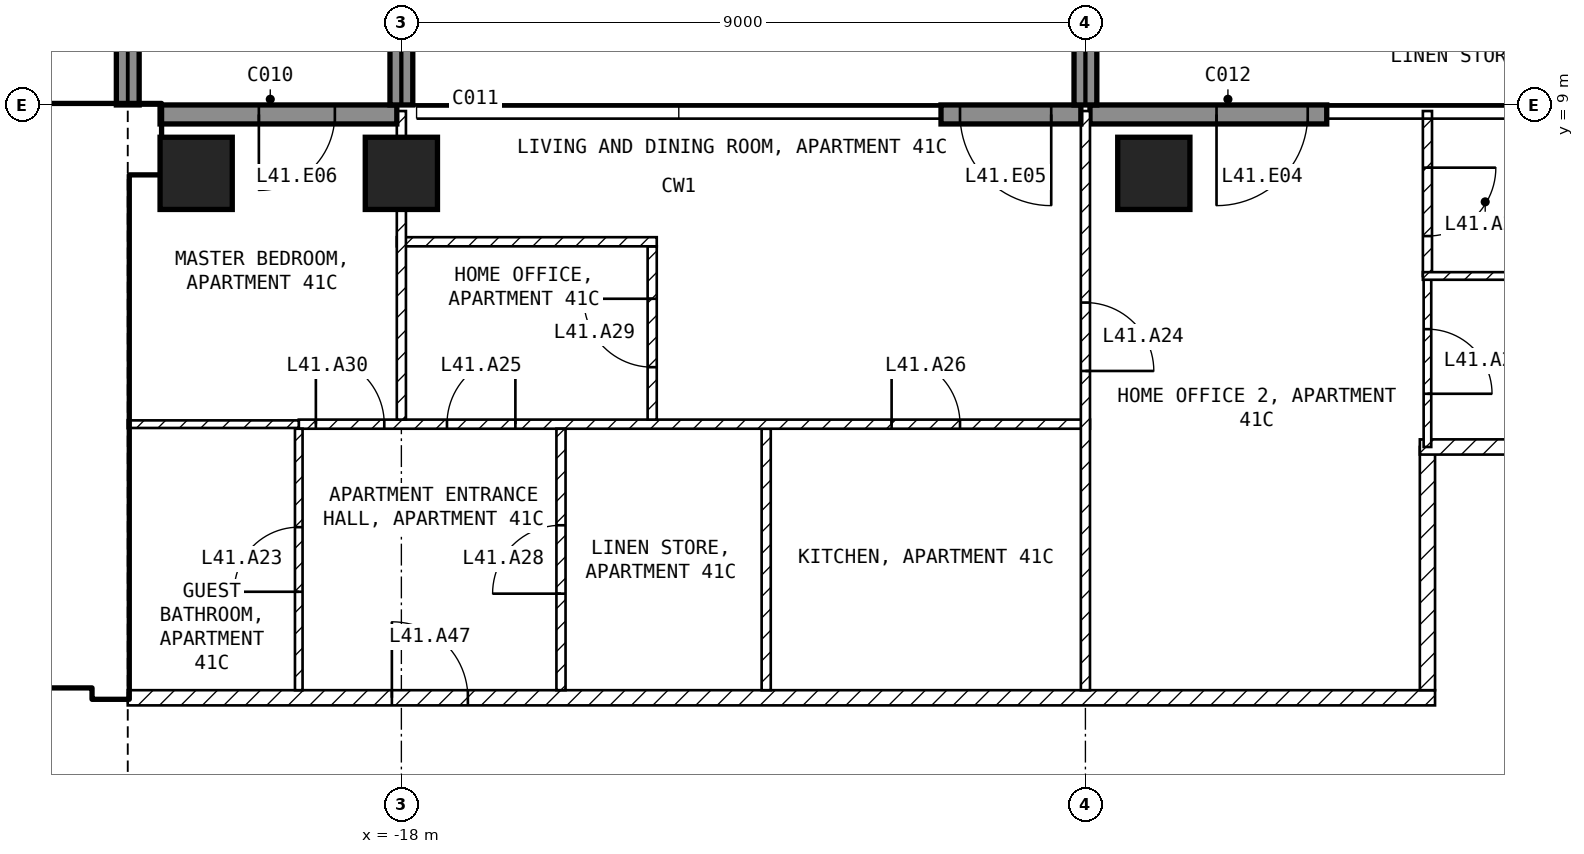
"""IFC4 building model, lengths in metres.
Left out: names, types, materials, properties, quantities, classifications, styles, units other than length and angle.
Written with IfcOpenShell. Run it as: python <this file> out.ifc"""

import sys

from ifc_helpers import new_model, si_unit, direction, frame, frame_2d, origin, origin_2d, place, context, subcontext, project, spatial, rectangle, extrude, element, fill, save


model = new_model("IFC4")
c1 = context("Model", 3, precision=1e-05, world=origin(), true_north=direction((0.0, 1.0)))
c2 = subcontext(c1, "Body", "Model", "MODEL_VIEW")
j1 = project(units=[si_unit("LENGTHUNIT", "METRE"), si_unit("PLANEANGLEUNIT", "RADIAN")], contexts=[c1])
p1 = place(None, origin())
s1 = spatial("IfcSite", under=j1, at=p1, CompositionType="ELEMENT")
p2 = place(p1, origin())
s2 = spatial("IfcBuilding", under=s1, at=p2, CompositionType="ELEMENT")
p3 = place(p2, frame((0.0, 0.0, 170.1)))
s3 = spatial("IfcBuildingStorey", under=s2, at=p3, CompositionType="ELEMENT", Elevation=170.1)
for number, where, z_axis, x_axis in (
    (1, (-20.7, 8.1, -0.25), (0.0, 0.0, 1.0), (1.0, 0.0, 0.0)),
    (2, (-18.0, 8.1, -0.25), (0.0, 0.0, 1.0), (1.0, 0.0, 0.0)),
    (3, (-8.1, 8.1, -0.25), (0.0, 0.0, 1.0), (1.0, 0.0, 0.0)),
):
    element("IfcColumn", number, at=place(p3, frame(where, z_axis=z_axis, x_axis=x_axis)), inside=s3, PredefinedType="COLUMN", context=c2, shape_type="SweptSolid", body=[
        extrude(rectangle(XDim=0.95, YDim=0.95, at=origin_2d()), origin(), (0.0, 0.0, 1.0), 3.5),
    ])
p4 = place(p3, frame((-5.825, 8.875, 0.0), z_axis=(0.0, 0.0, 1.0), x_axis=(-1.0, 0.0, 0.0)))
e4 = element("IfcWall", 4, at=p4, inside=s3, PredefinedType="SOLIDWALL", context=c2, shape_type="SweptSolid", body=[
    extrude(rectangle(XDim=3.115, YDim=0.25, at=frame_2d((1.558, 0.0))), origin(), (0.0, 0.0, 1.0), 3.25),
])
p5 = place(p4, frame((0.25, 0.0, 0.0)))
e5 = element("IfcOpeningElement", 5, at=p5, cuts=e4, PredefinedType="OPENING", context=c2, shape_type="SweptSolid", body=[
    extrude(rectangle(XDim=1.2, YDim=2.4, at=frame_2d((0.6, 1.2))), frame((0.0, 0.135, 0.0), z_axis=(0.0, -1.0, 0.0), x_axis=(1.0, 0.0, 0.0)), (0.0, 0.0, 1.0), 0.27),
])
p6 = place(p3, frame((-9.06, 8.875, 0.0), z_axis=(0.0, 0.0, 1.0), x_axis=(-1.0, 0.0, 0.0)))
e6 = element("IfcWall", 6, at=p6, inside=s3, PredefinedType="SOLIDWALL", context=c2, shape_type="SweptSolid", body=[
    extrude(rectangle(XDim=1.84, YDim=0.25, at=frame_2d((0.92, 0.0))), origin(), (0.0, 0.0, 1.0), 3.25),
])
p7 = place(p6, frame((0.39, 0.0, 0.0)))
e7 = element("IfcOpeningElement", 7, at=p7, cuts=e6, PredefinedType="OPENING", context=c2, shape_type="SweptSolid", body=[
    extrude(rectangle(XDim=1.2, YDim=2.4, at=frame_2d((0.6, 1.2))), frame((0.0, 0.135, 0.0), z_axis=(0.0, -1.0, 0.0), x_axis=(1.0, 0.0, 0.0)), (0.0, 0.0, 1.0), 0.27),
])
p8 = place(p3, frame((-18.06, 8.875, 0.0), z_axis=(0.0, 0.0, 1.0), x_axis=(-1.0, 0.0, 0.0)))
e8 = element("IfcWall", 8, at=p8, inside=s3, PredefinedType="SOLIDWALL", context=c2, shape_type="SweptSolid", body=[
    extrude(rectangle(XDim=3.115, YDim=0.25, at=frame_2d((1.558, 0.0))), origin(), (0.0, 0.0, 1.0), 3.25),
])
p9 = place(p8, frame((0.815, 0.0, 0.0)))
e9 = element("IfcOpeningElement", 9, at=p9, cuts=e8, PredefinedType="OPENING", context=c2, shape_type="SweptSolid", body=[
    extrude(rectangle(XDim=1.0, YDim=2.4, at=frame_2d((0.5, 1.2))), frame((0.0, 0.135, 0.0), z_axis=(0.0, -1.0, 0.0), x_axis=(1.0, 0.0, 0.0)), (0.0, 0.0, 1.0), 0.27),
])
for number, where, z_axis, x_axis in (
    (10, (-21.6, 9.0, 0.0), (0.0, 0.0, 1.0), (0.0, 1.0, 0.0)),
    (11, (-18.0, 9.0, 0.0), (0.0, 0.0, 1.0), (0.0, 1.0, 0.0)),
    (12, (-9.0, 9.0, 0.0), (0.0, 0.0, 1.0), (0.0, 1.0, 0.0)),
):
    element("IfcWall", number, at=place(p3, frame(where, z_axis=z_axis, x_axis=x_axis)), inside=s3, PredefinedType="SOLIDWALL", context=c2, shape_type="SweptSolid", body=[
        extrude(rectangle(XDim=2.7, YDim=0.3, at=frame_2d((1.35, 0.0))), origin(), (0.0, 0.0, 1.0), 3.25),
    ])
p10 = place(p3, frame((-29.6, 8.55, 0.0), z_axis=(0.0, 0.0, 1.0), x_axis=(1.0, 0.0, 0.0)))
e13 = element("IfcWall", 13, at=p10, inside=s3, PredefinedType="SHEAR", context=c2, shape_type="SweptSolid", body=[
    extrude(rectangle(XDim=8.425, YDim=0.9, at=frame_2d((4.212, 0.0))), origin(), (0.0, 0.0, 1.0), 3.25),
])
p11 = place(p3, frame((-21.825, 1.2, 0.0), z_axis=(0.0, 0.0, 1.0), x_axis=(0.0, 1.0, 0.0)))
e14 = element("IfcWall", 14, at=p11, inside=s3, PredefinedType="SHEAR", context=c2, shape_type="SweptSolid", body=[
    extrude(rectangle(XDim=6.9, YDim=0.45, at=frame_2d((3.45, 0.0))), origin(), (0.0, 0.0, 1.0), 3.25),
])
p12 = place(p3, frame((-33.2, 1.45, 0.0), z_axis=(0.0, 0.0, 1.0), x_axis=(1.0, 0.0, 0.0)))
e15 = element("IfcWall", 15, at=p12, inside=s3, PredefinedType="SOLIDWALL", context=c2, shape_type="SweptSolid", body=[
    extrude(rectangle(XDim=11.15, YDim=0.2, at=frame_2d((5.575, 0.0))), origin(), (0.0, 0.0, 1.0), 3.25),
])
p13 = place(p12, frame((9.4, 0.0, 0.0)))
e16 = element("IfcOpeningElement", 16, at=p13, cuts=e15, PredefinedType="OPENING", context=c2, shape_type="SweptSolid", body=[
    extrude(rectangle(XDim=1.0, YDim=2.1, at=frame_2d((0.5, 1.05))), frame((0.0, 0.11, 0.0), z_axis=(0.0, -1.0, 0.0), x_axis=(1.0, 0.0, 0.0)), (0.0, 0.0, 1.0), 0.22),
])
p14 = place(p12, frame((6.9, 0.0, 0.0)))
e17 = element("IfcOpeningElement", 17, at=p14, cuts=e15, PredefinedType="OPENING", context=c2, shape_type="SweptSolid", body=[
    extrude(rectangle(XDim=1.0, YDim=2.1, at=frame_2d((0.5, 1.05))), frame((0.0, 0.11, 0.0), z_axis=(0.0, -1.0, 0.0), x_axis=(1.0, 0.0, 0.0)), (0.0, 0.0, 1.0), 0.22),
])
p15 = place(p12, frame((1.1, 0.0, 0.0)))
e18 = element("IfcOpeningElement", 18, at=p15, cuts=e15, PredefinedType="OPENING", context=c2, shape_type="SweptSolid", body=[
    extrude(rectangle(XDim=0.9, YDim=2.1, at=frame_2d((0.45, 1.05))), frame((0.0, 0.11, 0.0), z_axis=(0.0, -1.0, 0.0), x_axis=(1.0, 0.0, 0.0)), (0.0, 0.0, 1.0), 0.22),
])
p16 = place(p3, frame((-28.35, 5.15, 0.0), z_axis=(0.0, 0.0, 1.0), x_axis=(1.0, 0.0, 0.0)))
e19 = element("IfcWall", 19, at=p16, inside=s3, PredefinedType="SOLIDWALL", context=c2, shape_type="SweptSolid", body=[
    extrude(rectangle(XDim=6.3, YDim=0.2, at=frame_2d((3.15, 0.0))), origin(), (0.0, 0.0, 1.0), 3.25),
])
p17 = place(p16, frame((5.1, 0.0, 0.0)))
e20 = element("IfcOpeningElement", 20, at=p17, cuts=e19, PredefinedType="OPENING", context=c2, shape_type="SweptSolid", body=[
    extrude(rectangle(XDim=1.0, YDim=2.1, at=frame_2d((0.5, 1.05))), frame((0.0, 0.11, 0.0), z_axis=(0.0, -1.0, 0.0), x_axis=(1.0, 0.0, 0.0)), (0.0, 0.0, 1.0), 0.22),
])
p18 = place(p3, frame((-21.6, 1.2, 0.0), z_axis=(0.0, 0.0, 1.0), x_axis=(1.0, 0.0, 0.0)))
e21 = element("IfcWall", 21, at=p18, inside=s3, PredefinedType="PARTITIONING", context=c2, shape_type="SweptSolid", body=[
    extrude(rectangle(XDim=17.2, YDim=0.2, at=frame_2d((8.6, 0.0))), origin(), (0.0, 0.0, 1.0), 3.25),
])
p19 = place(p18, frame((3.475, 0.0, 0.0)))
e22 = element("IfcOpeningElement", 22, at=p19, cuts=e21, PredefinedType="OPENING", context=c2, shape_type="SweptSolid", body=[
    extrude(rectangle(XDim=1.0, YDim=2.1, at=frame_2d((0.5, 1.05))), frame((0.0, 0.11, 0.0), z_axis=(0.0, -1.0, 0.0), x_axis=(1.0, 0.0, 0.0)), (0.0, 0.0, 1.0), 0.22),
])
p20 = place(p3, frame((-4.5, 1.3, 0.0), z_axis=(0.0, 0.0, 1.0), x_axis=(0.0, 1.0, 0.0)))
e23 = element("IfcWall", 23, at=p20, inside=s3, PredefinedType="PARTITIONING", context=c2, shape_type="SweptSolid", body=[
    extrude(rectangle(XDim=3.2, YDim=0.2, at=frame_2d((1.6, 0.0))), origin(), (0.0, 0.0, 1.0), 3.25),
])
p21 = place(p3, frame((-4.6, 4.5, 0.0), z_axis=(0.0, 0.0, 1.0), x_axis=(1.0, 0.0, 0.0)))
e24 = element("IfcWall", 24, at=p21, inside=s3, PredefinedType="PARTITIONING", context=c2, shape_type="SweptSolid", body=[
    extrude(rectangle(XDim=3.5, YDim=0.2, at=frame_2d((1.75, 0.0))), origin(), (0.0, 0.0, 1.0), 3.25),
])
p22 = place(p3, frame((-13.2, 1.3, 0.0), z_axis=(0.0, 0.0, 1.0), x_axis=(0.0, 1.0, 0.0)))
e25 = element("IfcWall", 25, at=p22, inside=s3, PredefinedType="PARTITIONING", context=c2, shape_type="SweptSolid", body=[
    extrude(rectangle(XDim=3.44, YDim=0.12, at=frame_2d((1.72, 0.0))), origin(), (0.0, 0.0, 1.0), 3.25),
])
p23 = place(p3, frame((-19.35, 4.8, 0.0), z_axis=(0.0, 0.0, 1.0), x_axis=(1.0, 0.0, 0.0)))
e26 = element("IfcWall", 26, at=p23, inside=s3, PredefinedType="PARTITIONING", context=c2, shape_type="SweptSolid", body=[
    extrude(rectangle(XDim=10.41, YDim=0.12, at=frame_2d((5.205, 0.0))), origin(), (0.0, 0.0, 1.0), 3.25),
])
p24 = place(p23, frame((1.95, 0.0, 0.0)))
e27 = element("IfcOpeningElement", 27, at=p24, cuts=e26, PredefinedType="OPENING", context=c2, shape_type="SweptSolid", body=[
    extrude(rectangle(XDim=0.9, YDim=2.1, at=frame_2d((0.45, 1.05))), frame((0.0, 0.07, 0.0), z_axis=(0.0, -1.0, 0.0), x_axis=(1.0, 0.0, 0.0)), (0.0, 0.0, 1.0), 0.14),
])
p25 = place(p23, frame((7.8, 0.0, 0.0)))
e28 = element("IfcOpeningElement", 28, at=p25, cuts=e26, PredefinedType="OPENING", context=c2, shape_type="SweptSolid", body=[
    extrude(rectangle(XDim=0.9, YDim=2.1, at=frame_2d((0.45, 1.05))), frame((0.0, 0.07, 0.0), z_axis=(0.0, -1.0, 0.0), x_axis=(1.0, 0.0, 0.0)), (0.0, 0.0, 1.0), 0.14),
])
p26 = place(p23, frame((0.225, 0.0, 0.0)))
e29 = element("IfcOpeningElement", 29, at=p26, cuts=e26, PredefinedType="OPENING", context=c2, shape_type="SweptSolid", body=[
    extrude(rectangle(XDim=0.9, YDim=2.1, at=frame_2d((0.45, 1.05))), frame((0.0, 0.07, 0.0), z_axis=(0.0, -1.0, 0.0), x_axis=(1.0, 0.0, 0.0)), (0.0, 0.0, 1.0), 0.14),
])
p27 = place(p3, frame((-9.0, 8.92, 0.0), z_axis=(0.0, 0.0, 1.0), x_axis=(0.0, -1.0, 0.0)))
e30 = element("IfcWall", 30, at=p27, inside=s3, PredefinedType="PARTITIONING", context=c2, shape_type="SweptSolid", body=[
    extrude(rectangle(XDim=7.62, YDim=0.12, at=frame_2d((3.81, 0.0))), origin(), (0.0, 0.0, 1.0), 3.25),
])
p28 = place(p27, frame((2.52, 0.0, 0.0)))
e31 = element("IfcOpeningElement", 31, at=p28, cuts=e30, PredefinedType="OPENING", context=c2, shape_type="SweptSolid", body=[
    extrude(rectangle(XDim=0.9, YDim=2.1, at=frame_2d((0.45, 1.05))), frame((0.0, 0.07, 0.0), z_axis=(0.0, -1.0, 0.0), x_axis=(1.0, 0.0, 0.0)), (0.0, 0.0, 1.0), 0.14),
])
p29 = place(p3, frame((-15.9, 1.3, 0.0), z_axis=(0.0, 0.0, 1.0), x_axis=(0.0, 1.0, 0.0)))
e32 = element("IfcWall", 32, at=p29, inside=s3, PredefinedType="PARTITIONING", context=c2, shape_type="SweptSolid", body=[
    extrude(rectangle(XDim=3.44, YDim=0.12, at=frame_2d((1.72, 0.0))), origin(), (0.0, 0.0, 1.0), 3.25),
])
p30 = place(p29, frame((1.27, 0.0, 0.0)))
e33 = element("IfcOpeningElement", 33, at=p30, cuts=e32, PredefinedType="OPENING", context=c2, shape_type="SweptSolid", body=[
    extrude(rectangle(XDim=0.9, YDim=2.1, at=frame_2d((0.45, 1.05))), frame((0.0, 0.07, 0.0), z_axis=(0.0, -1.0, 0.0), x_axis=(1.0, 0.0, 0.0)), (0.0, 0.0, 1.0), 0.14),
])
p31 = place(p3, frame((-19.35, 1.3, 0.0), z_axis=(0.0, 0.0, 1.0), x_axis=(0.0, 1.0, 0.0)))
e34 = element("IfcWall", 34, at=p31, inside=s3, PredefinedType="PARTITIONING", context=c2, shape_type="SweptSolid", body=[
    extrude(rectangle(XDim=3.44, YDim=0.1, at=frame_2d((1.72, 0.0))), origin(), (0.0, 0.0, 1.0), 3.25),
])
p32 = place(p31, frame((1.295, 0.0, 0.0)))
e35 = element("IfcOpeningElement", 35, at=p32, cuts=e34, PredefinedType="OPENING", context=c2, shape_type="SweptSolid", body=[
    extrude(rectangle(XDim=0.85, YDim=2.1, at=frame_2d((0.425, 1.05))), frame((0.0, 0.06, 0.0), z_axis=(0.0, -1.0, 0.0), x_axis=(1.0, 0.0, 0.0)), (0.0, 0.0, 1.0), 0.12),
])
p33 = place(p3, frame((-21.6, 4.8, 0.0), z_axis=(0.0, 0.0, 1.0), x_axis=(1.0, 0.0, 0.0)))
e36 = element("IfcWall", 36, at=p33, inside=s3, PredefinedType="PARTITIONING", context=c2, shape_type="SweptSolid", body=[
    extrude(rectangle(XDim=2.25, YDim=0.1, at=frame_2d((1.125, 0.0))), origin(), (0.0, 0.0, 1.0), 3.25),
])
p34 = place(p3, frame((-14.7, 4.86, 0.0), z_axis=(0.0, 0.0, 1.0), x_axis=(0.0, 1.0, 0.0)))
e37 = element("IfcWall", 37, at=p34, inside=s3, PredefinedType="PARTITIONING", context=c2, shape_type="SweptSolid", body=[
    extrude(rectangle(XDim=2.28, YDim=0.12, at=frame_2d((1.14, 0.0))), origin(), (0.0, 0.0, 1.0), 3.25),
])
p35 = place(p34, frame((0.69, 0.0, 0.0)))
e38 = element("IfcOpeningElement", 38, at=p35, cuts=e37, PredefinedType="OPENING", context=c2, shape_type="SweptSolid", body=[
    extrude(rectangle(XDim=0.9, YDim=2.1, at=frame_2d((0.45, 1.05))), frame((0.0, 0.07, 0.0), z_axis=(0.0, -1.0, 0.0), x_axis=(1.0, 0.0, 0.0)), (0.0, 0.0, 1.0), 0.14),
])
p36 = place(p3, frame((-14.64, 7.2, 0.0), z_axis=(0.0, 0.0, 1.0), x_axis=(-1.0, 0.0, 0.0)))
e39 = element("IfcWall", 39, at=p36, inside=s3, PredefinedType="PARTITIONING", context=c2, shape_type="SweptSolid", body=[
    extrude(rectangle(XDim=3.42, YDim=0.12, at=frame_2d((1.71, 0.0))), origin(), (0.0, 0.0, 1.0), 3.25),
])
p37 = place(p3, frame((-18.0, 4.86, 0.0), z_axis=(0.0, 0.0, 1.0), x_axis=(0.0, 1.0, 0.0)))
e40 = element("IfcWall", 40, at=p37, inside=s3, PredefinedType="PARTITIONING", context=c2, shape_type="SweptSolid", body=[
    extrude(rectangle(XDim=4.06, YDim=0.12, at=frame_2d((2.03, 0.0))), origin(), (0.0, 0.0, 1.0), 2.48),
])
p38 = place(p3, frame((-4.5, 6.75, 0.0), z_axis=(0.0, 0.0, 1.0), x_axis=(0.0, -1.0, 0.0)))
e41 = element("IfcWall", 41, at=p38, inside=s3, PredefinedType="PARTITIONING", context=c2, shape_type="SweptSolid", body=[
    extrude(rectangle(XDim=2.25, YDim=0.1, at=frame_2d((1.125, 0.0))), origin(), (0.0, 0.0, 1.0), 3.25),
])
p39 = place(p38, frame((0.7, 0.0, 0.0)))
e42 = element("IfcOpeningElement", 42, at=p39, cuts=e41, PredefinedType="OPENING", context=c2, shape_type="SweptSolid", body=[
    extrude(rectangle(XDim=0.85, YDim=2.1, at=frame_2d((0.425, 1.05))), frame((0.0, 0.06, 0.0), z_axis=(0.0, -1.0, 0.0), x_axis=(1.0, 0.0, 0.0)), (0.0, 0.0, 1.0), 0.12),
])
p40 = place(p3, frame((-4.5, 8.92, 0.0), z_axis=(0.0, 0.0, 1.0), x_axis=(0.0, -1.0, 0.0)))
e43 = element("IfcWall", 43, at=p40, inside=s3, PredefinedType="PARTITIONING", context=c2, shape_type="SweptSolid", body=[
    extrude(rectangle(XDim=2.17, YDim=0.12, at=frame_2d((1.085, 0.0))), origin(), (0.0, 0.0, 1.0), 3.25),
])
p41 = place(p40, frame((0.745, 0.0, 0.0)))
e44 = element("IfcOpeningElement", 44, at=p41, cuts=e43, PredefinedType="OPENING", context=c2, shape_type="SweptSolid", body=[
    extrude(rectangle(XDim=0.9, YDim=2.1, at=frame_2d((0.45, 1.05))), frame((0.0, 0.07, 0.0), z_axis=(0.0, -1.0, 0.0), x_axis=(1.0, 0.0, 0.0)), (0.0, 0.0, 1.0), 0.14),
])
p42 = place(p3, frame((-4.56, 6.75, 0.0), z_axis=(0.0, 0.0, 1.0), x_axis=(1.0, 0.0, 0.0)))
e45 = element("IfcWall", 45, at=p42, inside=s3, PredefinedType="PARTITIONING", context=c2, shape_type="SweptSolid", body=[
    extrude(rectangle(XDim=3.46, YDim=0.1, at=frame_2d((1.73, 0.0))), origin(), (0.0, 0.0, 1.0), 3.25),
])
p43 = place(p5, origin())
e46 = element("IfcDoor", 46, at=p43, inside=s3, OperationType="SINGLE_SWING_RIGHT", PredefinedType="DOOR", context=c2, shape_type="SweptSolid", body=[
    extrude(rectangle(XDim=1.2, YDim=2.4, at=frame_2d((0.6, 1.2))), frame((0.0, 0.025, 0.0), z_axis=(0.0, -1.0, 0.0), x_axis=(1.0, 0.0, 0.0)), (0.0, 0.0, 1.0), 0.05),
])
fill(e5, e46)
p44 = place(p7, origin())
e47 = element("IfcDoor", 47, at=p44, inside=s3, OperationType="SINGLE_SWING_LEFT", PredefinedType="DOOR", context=c2, shape_type="SweptSolid", body=[
    extrude(rectangle(XDim=1.2, YDim=2.4, at=frame_2d((0.6, 1.2))), frame((0.0, 0.025, 0.0), z_axis=(0.0, -1.0, 0.0), x_axis=(1.0, 0.0, 0.0)), (0.0, 0.0, 1.0), 0.05),
])
fill(e7, e47)
p45 = place(p9, origin())
e48 = element("IfcDoor", 48, at=p45, inside=s3, OperationType="SINGLE_SWING_RIGHT", PredefinedType="DOOR", context=c2, shape_type="SweptSolid", body=[
    extrude(rectangle(XDim=1.0, YDim=2.4, at=frame_2d((0.5, 1.2))), frame((0.0, 0.025, 0.0), z_axis=(0.0, -1.0, 0.0), x_axis=(1.0, 0.0, 0.0)), (0.0, 0.0, 1.0), 0.05),
])
fill(e9, e48)
p46 = place(p17, origin())
e49 = element("IfcDoor", 49, at=p46, inside=s3, OperationType="SINGLE_SWING_LEFT", PredefinedType="DOOR", context=c2, shape_type="SweptSolid", body=[
    extrude(rectangle(XDim=1.0, YDim=2.1, at=frame_2d((0.5, 1.05))), frame((0.0, 0.025, 0.0), z_axis=(0.0, -1.0, 0.0), x_axis=(1.0, 0.0, 0.0)), (0.0, 0.0, 1.0), 0.05),
])
fill(e20, e49)
p47 = place(p39, origin())
e50 = element("IfcDoor", 50, at=p47, inside=s3, OperationType="SINGLE_SWING_RIGHT", PredefinedType="DOOR", context=c2, shape_type="SweptSolid", body=[
    extrude(rectangle(XDim=0.85, YDim=2.1, at=frame_2d((0.425, 1.05))), frame((0.0, 0.025, 0.0), z_axis=(0.0, -1.0, 0.0), x_axis=(1.0, 0.0, 0.0)), (0.0, 0.0, 1.0), 0.05),
])
fill(e42, e50)
p48 = place(p32, origin())
e51 = element("IfcDoor", 51, at=p48, inside=s3, OperationType="SINGLE_SWING_LEFT", PredefinedType="DOOR", context=c2, shape_type="SweptSolid", body=[
    extrude(rectangle(XDim=0.85, YDim=2.1, at=frame_2d((0.425, 1.05))), frame((0.0, 0.025, 0.0), z_axis=(0.0, -1.0, 0.0), x_axis=(1.0, 0.0, 0.0)), (0.0, 0.0, 1.0), 0.05),
])
fill(e35, e51)
p49 = place(p28, origin())
e52 = element("IfcDoor", 52, at=p49, inside=s3, OperationType="SINGLE_SWING_RIGHT", PredefinedType="DOOR", context=c2, shape_type="SweptSolid", body=[
    extrude(rectangle(XDim=0.9, YDim=2.1, at=frame_2d((0.45, 1.05))), frame((0.0, 0.025, 0.0), z_axis=(0.0, -1.0, 0.0), x_axis=(1.0, 0.0, 0.0)), (0.0, 0.0, 1.0), 0.05),
])
fill(e31, e52)
p50 = place(p24, origin())
e53 = element("IfcDoor", 53, at=p50, inside=s3, OperationType="SINGLE_SWING_RIGHT", PredefinedType="DOOR", context=c2, shape_type="SweptSolid", body=[
    extrude(rectangle(XDim=0.9, YDim=2.1, at=frame_2d((0.45, 1.05))), frame((0.0, 0.025, 0.0), z_axis=(0.0, -1.0, 0.0), x_axis=(1.0, 0.0, 0.0)), (0.0, 0.0, 1.0), 0.05),
])
fill(e27, e53)
p51 = place(p25, origin())
e54 = element("IfcDoor", 54, at=p51, inside=s3, OperationType="SINGLE_SWING_LEFT", PredefinedType="DOOR", context=c2, shape_type="SweptSolid", body=[
    extrude(rectangle(XDim=0.9, YDim=2.1, at=frame_2d((0.45, 1.05))), frame((0.0, 0.025, 0.0), z_axis=(0.0, -1.0, 0.0), x_axis=(1.0, 0.0, 0.0)), (0.0, 0.0, 1.0), 0.05),
])
fill(e28, e54)
p52 = place(p41, origin())
e55 = element("IfcDoor", 55, at=p52, inside=s3, OperationType="SINGLE_SWING_LEFT", PredefinedType="DOOR", context=c2, shape_type="SweptSolid", body=[
    extrude(rectangle(XDim=0.9, YDim=2.1, at=frame_2d((0.45, 1.05))), frame((0.0, 0.025, 0.0), z_axis=(0.0, -1.0, 0.0), x_axis=(1.0, 0.0, 0.0)), (0.0, 0.0, 1.0), 0.05),
])
fill(e44, e55)
p53 = place(p30, origin())
e56 = element("IfcDoor", 56, at=p53, inside=s3, OperationType="SINGLE_SWING_LEFT", PredefinedType="DOOR", context=c2, shape_type="SweptSolid", body=[
    extrude(rectangle(XDim=0.9, YDim=2.1, at=frame_2d((0.45, 1.05))), frame((0.0, 0.025, 0.0), z_axis=(0.0, -1.0, 0.0), x_axis=(1.0, 0.0, 0.0)), (0.0, 0.0, 1.0), 0.05),
])
fill(e33, e56)
p54 = place(p35, origin())
e57 = element("IfcDoor", 57, at=p54, inside=s3, OperationType="SINGLE_SWING_RIGHT", PredefinedType="DOOR", context=c2, shape_type="SweptSolid", body=[
    extrude(rectangle(XDim=0.9, YDim=2.1, at=frame_2d((0.45, 1.05))), frame((0.0, 0.025, 0.0), z_axis=(0.0, -1.0, 0.0), x_axis=(1.0, 0.0, 0.0)), (0.0, 0.0, 1.0), 0.05),
])
fill(e38, e57)
p55 = place(p26, origin())
e58 = element("IfcDoor", 58, at=p55, inside=s3, OperationType="SINGLE_SWING_LEFT", PredefinedType="DOOR", context=c2, shape_type="SweptSolid", body=[
    extrude(rectangle(XDim=0.9, YDim=2.1, at=frame_2d((0.45, 1.05))), frame((0.0, 0.025, 0.0), z_axis=(0.0, -1.0, 0.0), x_axis=(1.0, 0.0, 0.0)), (0.0, 0.0, 1.0), 0.05),
])
fill(e29, e58)
p56 = place(p19, origin())
e59 = element("IfcDoor", 59, at=p56, inside=s3, OperationType="SINGLE_SWING_LEFT", PredefinedType="DOOR", context=c2, shape_type="SweptSolid", body=[
    extrude(rectangle(XDim=1.0, YDim=2.1, at=frame_2d((0.5, 1.05))), frame((0.0, 0.025, 0.0), z_axis=(0.0, -1.0, 0.0), x_axis=(1.0, 0.0, 0.0)), (0.0, 0.0, 1.0), 0.05),
])
fill(e22, e59)
save(model, sys.argv[1])
